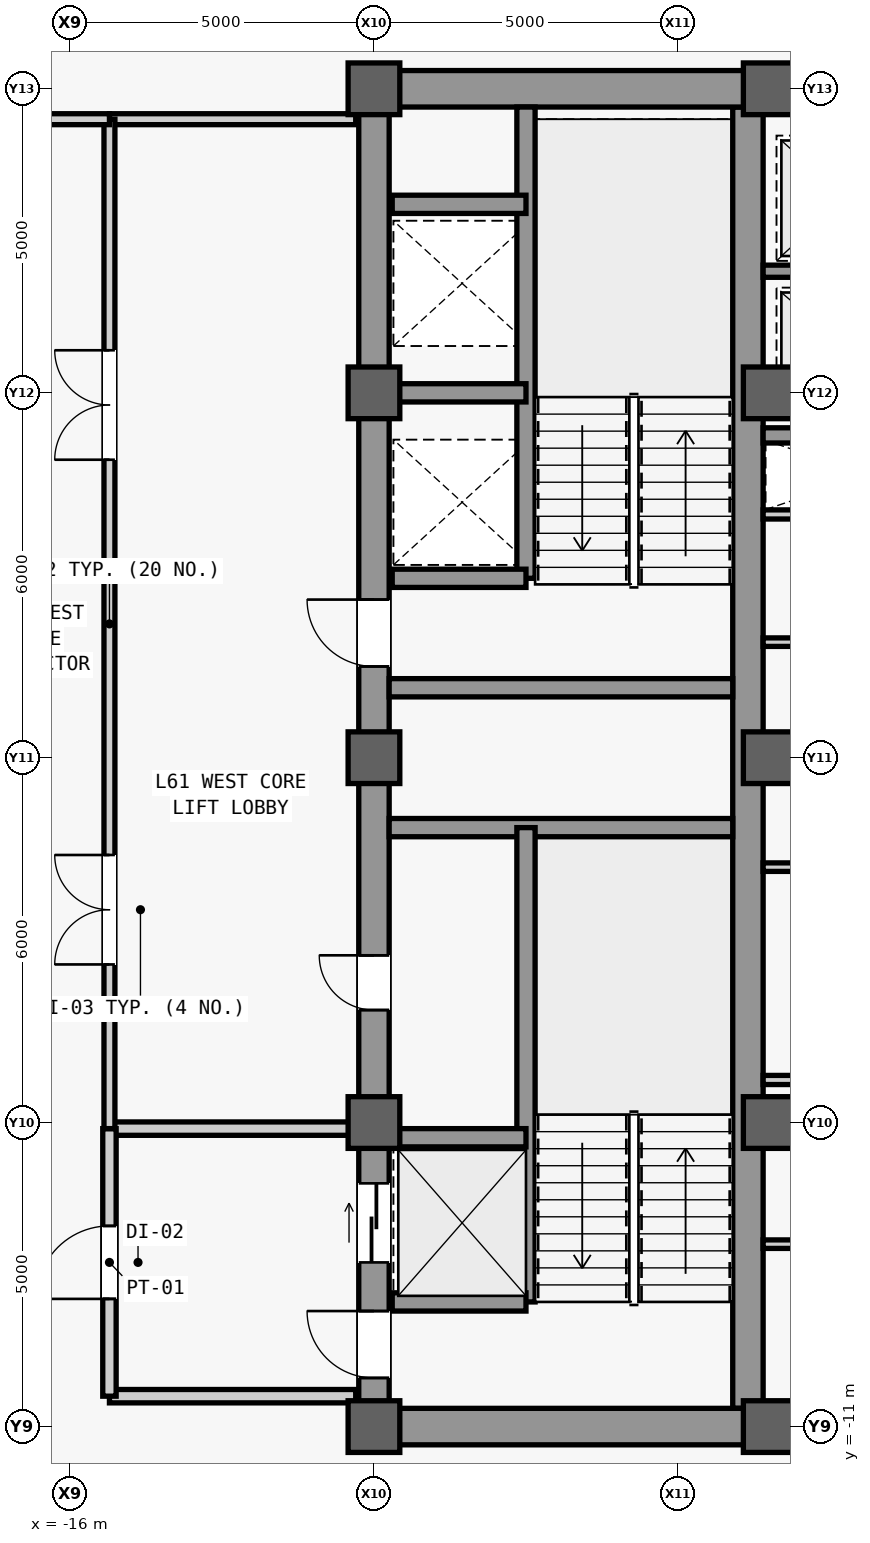
"""IFC4 building model, lengths in metres.
Left out: names, types, materials, properties, quantities, classifications, styles, units other than length and angle.
Written with IfcOpenShell. Run it as: python <this file> out.ifc"""

import sys

from ifc_helpers import new_model, si_unit, direction, frame, frame_2d, origin, origin_2d, place, context, subcontext, project, spatial, rectangle, extrude, source, transform, mapped, element, fill, save


model = new_model("IFC4")
c1 = context("Model", 3, precision=1e-05, world=origin(), true_north=direction((0.0, 1.0)))
c2 = subcontext(c1, "Body", "Model", "MODEL_VIEW")
j1 = project(units=[si_unit("LENGTHUNIT", "METRE"), si_unit("PLANEANGLEUNIT", "RADIAN")], contexts=[c1])
p1 = place(None, origin())
s1 = spatial("IfcSite", under=j1, at=p1, CompositionType="ELEMENT")
p2 = place(p1, origin())
s2 = spatial("IfcBuilding", under=s1, at=p2, CompositionType="ELEMENT")
p3 = place(p2, frame((0.0, 0.0, 259.1)))
s3 = spatial("IfcBuildingStorey", under=s2, at=p3, CompositionType="ELEMENT", Elevation=259.1)
m1 = source(origin(), c2, "Body", "SweptSolid", [
    extrude(rectangle(XDim=22.0, YDim=0.5, at=frame_2d((11.0, 0.0))), origin(), (0.0, 0.0, 1.0), 3.78),
])
p4 = place(p3, frame((-11.0, -11.0, 0.0), z_axis=(0.0, 0.0, 1.0), x_axis=(0.0, 1.0, 0.0)))
e1 = element("IfcWall", 1, at=p4, inside=s3, PredefinedType="SHEAR", context=c2, shape_type="MappedRepresentation", body=[
    mapped(m1, transform((0.0, 0.0, 0.0), scale=1.0)),
])
m2 = source(origin(), c2, "Body", "SweptSolid", [
    extrude(rectangle(XDim=1.1, YDim=2.2, at=frame_2d((0.55, 1.1))), frame((0.0, 0.26, 0.0), z_axis=(0.0, -1.0, 0.0), x_axis=(1.0, 0.0, 0.0)), (0.0, 0.0, 1.0), 0.52),
])
p5 = place(p4, frame((0.8, 0.0, 0.0)))
e2 = element("IfcOpeningElement", 2, at=p5, cuts=e1, PredefinedType="OPENING", context=c2, shape_type="MappedRepresentation", body=[
    mapped(m2, transform((0.0, 0.0, 0.0), scale=1.0)),
])
p6 = place(p4, frame((12.5, 0.0, 0.0)))
e3 = element("IfcOpeningElement", 3, at=p6, cuts=e1, PredefinedType="OPENING", context=c2, shape_type="MappedRepresentation", body=[
    mapped(m2, transform((0.0, 0.0, 0.0), scale=1.0)),
])
m3 = source(origin(), c2, "Body", "SweptSolid", [
    extrude(rectangle(XDim=0.9, YDim=2.15, at=frame_2d((0.45, 1.075))), frame((0.0, 0.26, 0.0), z_axis=(0.0, -1.0, 0.0), x_axis=(1.0, 0.0, 0.0)), (0.0, 0.0, 1.0), 0.52),
])
p7 = place(p4, frame((6.85, 0.0, 0.0)))
e4 = element("IfcOpeningElement", 4, at=p7, cuts=e1, PredefinedType="OPENING", context=c2, shape_type="MappedRepresentation", body=[
    mapped(m3, transform((0.0, 0.0, 0.0), scale=1.0)),
])
m4 = source(origin(), c2, "Body", "SweptSolid", [
    extrude(rectangle(XDim=1.3, YDim=2.3, at=frame_2d((0.65, 1.15))), frame((0.0, 0.26, 0.0), z_axis=(0.0, -1.0, 0.0), x_axis=(1.0, 0.0, 0.0)), (0.0, 0.0, 1.0), 0.52),
])
p8 = place(p4, frame((2.7, 0.0, 0.0)))
e5 = element("IfcOpeningElement", 5, at=p8, cuts=e1, PredefinedType="OPENING", context=c2, shape_type="MappedRepresentation", body=[
    mapped(m4, transform((0.0, 0.0, 0.0), scale=1.0)),
])
m5 = source(origin(), c2, "Body", "SweptSolid", [
    extrude(rectangle(XDim=21.4, YDim=0.5, at=frame_2d((10.7, 0.0))), origin(), (0.0, 0.0, 1.0), 3.78),
])
p9 = place(p3, frame((-4.85, -10.7, 0.0), z_axis=(0.0, 0.0, 1.0), x_axis=(0.0, 1.0, 0.0)))
e6 = element("IfcWall", 6, at=p9, inside=s3, PredefinedType="SHEAR", context=c2, shape_type="MappedRepresentation", body=[
    mapped(m5, transform((0.0, 0.0, 0.0), scale=1.0)),
])
m6 = source(origin(), c2, "Body", "SweptSolid", [
    extrude(rectangle(XDim=5.9, YDim=0.6, at=frame_2d((2.95, 0.0))), origin(), (0.0, 0.0, 1.0), 3.78),
])
for number, where, z_axis, x_axis in (
    (7, (-10.75, -11.0, 0.0), (0.0, 0.0, 1.0), (1.0, 0.0, 0.0)),
    (8, (-10.75, 11.0, 0.0), (0.0, 0.0, 1.0), (1.0, 0.0, 0.0)),
):
    element("IfcWall", number, at=place(p3, frame(where, z_axis=z_axis, x_axis=x_axis)), inside=s3, PredefinedType="SHEAR", context=c2, shape_type="MappedRepresentation", body=[
        mapped(m6, transform((0.0, 0.0, 0.0), scale=1.0)),
    ])
m7 = source(origin(), c2, "Body", "SweptSolid", [
    extrude(rectangle(XDim=5.65, YDim=0.3, at=frame_2d((2.825, 0.0))), origin(), (0.0, 0.0, 1.0), 3.78),
])
for number, where, z_axis, x_axis in (
    (9, (-10.75, -1.15, 0.0), (0.0, 0.0, 1.0), (1.0, 0.0, 0.0)),
    (10, (-10.75, 1.15, 0.0), (0.0, 0.0, 1.0), (1.0, 0.0, 0.0)),
):
    element("IfcWall", number, at=place(p3, frame(where, z_axis=z_axis, x_axis=x_axis)), inside=s3, PredefinedType="SHEAR", context=c2, shape_type="MappedRepresentation", body=[
        mapped(m7, transform((0.0, 0.0, 0.0), scale=1.0)),
    ])
m8 = source(origin(), c2, "Body", "SweptSolid", [
    extrude(rectangle(XDim=9.2, YDim=0.5, at=frame_2d((4.6, 0.0))), origin(), (0.0, 0.0, 1.0), 3.78),
])
p10 = place(p3, frame((-4.6, -11.0, 0.0), z_axis=(0.0, 0.0, 1.0), x_axis=(1.0, 0.0, 0.0)))
e11 = element("IfcWall", 11, at=p10, inside=s3, PredefinedType="SHEAR", context=c2, shape_type="MappedRepresentation", body=[
    mapped(m8, transform((0.0, 0.0, 0.0), scale=1.0)),
])
m9 = source(origin(), c2, "Body", "SweptSolid", [
    extrude(rectangle(XDim=1.8, YDim=2.25, at=frame_2d((0.9, 1.125))), frame((0.0, 0.26, 0.0), z_axis=(0.0, -1.0, 0.0), x_axis=(1.0, 0.0, 0.0)), (0.0, 0.0, 1.0), 0.52),
])
p11 = place(p10, frame((3.7, 0.0, 0.0)))
e12 = element("IfcOpeningElement", 12, at=p11, cuts=e11, PredefinedType="OPENING", context=c2, shape_type="MappedRepresentation", body=[
    mapped(m9, transform((0.0, 0.0, 0.0), scale=1.0)),
])
p12 = place(p3, frame((-4.6, 11.0, 0.0), z_axis=(0.0, 0.0, 1.0), x_axis=(1.0, 0.0, 0.0)))
e13 = element("IfcWall", 13, at=p12, inside=s3, PredefinedType="SHEAR", context=c2, shape_type="MappedRepresentation", body=[
    mapped(m8, transform((0.0, 0.0, 0.0), scale=1.0)),
])
p13 = place(p12, frame((3.7, 0.0, 0.0)))
e14 = element("IfcOpeningElement", 14, at=p13, cuts=e13, PredefinedType="OPENING", context=c2, shape_type="MappedRepresentation", body=[
    mapped(m9, transform((0.0, 0.0, 0.0), scale=1.0)),
])
m10 = source(origin(), c2, "Body", "SweptSolid", [
    extrude(rectangle(XDim=0.85, YDim=0.85, at=origin_2d()), origin(), (0.0, 0.0, 1.0), 4.0),
])
for number, where, z_axis, x_axis in (
    (15, (-11.0, -11.0, 0.0), (0.0, 0.0, 1.0), (1.0, 0.0, 0.0)),
    (16, (-11.0, -6.0, 0.0), (0.0, 0.0, 1.0), (1.0, 0.0, 0.0)),
    (17, (-11.0, 0.0, 0.0), (0.0, 0.0, 1.0), (1.0, 0.0, 0.0)),
    (18, (-11.0, 6.0, 0.0), (0.0, 0.0, 1.0), (1.0, 0.0, 0.0)),
    (19, (-11.0, 11.0, 0.0), (0.0, 0.0, 1.0), (1.0, 0.0, 0.0)),
    (20, (-4.5, -11.0, 0.0), (0.0, 0.0, 1.0), (1.0, 0.0, 0.0)),
    (21, (-4.5, -6.0, 0.0), (0.0, 0.0, 1.0), (1.0, 0.0, 0.0)),
    (22, (-4.5, 0.0, 0.0), (0.0, 0.0, 1.0), (1.0, 0.0, 0.0)),
    (23, (-4.5, 6.0, 0.0), (0.0, 0.0, 1.0), (1.0, 0.0, 0.0)),
    (24, (-4.5, 11.0, 0.0), (0.0, 0.0, 1.0), (1.0, 0.0, 0.0)),
):
    element("IfcColumn", number, at=place(p3, frame(where, z_axis=z_axis, x_axis=x_axis)), inside=s3, PredefinedType="COLUMN", context=c2, shape_type="MappedRepresentation", body=[
        mapped(m10, transform((0.0, 0.0, 0.0), scale=1.0)),
    ])
m11 = source(origin(), c2, "Body", "SweptSolid", [
    extrude(rectangle(XDim=7.8, YDim=0.3, at=frame_2d((3.9, 0.0))), origin(), (0.0, 0.0, 1.0), 3.78),
])
p14 = place(p3, frame((-8.5, -8.95, 0.0), z_axis=(0.0, 0.0, 1.0), x_axis=(0.0, 1.0, 0.0)))
e25 = element("IfcWall", 25, at=p14, inside=s3, PredefinedType="SHEAR", context=c2, shape_type="MappedRepresentation", body=[
    mapped(m11, transform((0.0, 0.0, 0.0), scale=1.0)),
])
m12 = source(origin(), c2, "Body", "SweptSolid", [
    extrude(rectangle(XDim=2.2, YDim=0.3, at=frame_2d((1.1, 0.0))), origin(), (0.0, 0.0, 1.0), 3.78),
])
for number, where, z_axis, x_axis in (
    (26, (-10.7, -8.95, 0.0), (0.0, 0.0, 1.0), (1.0, 0.0, 0.0)),
    (27, (-10.7, -6.25, 0.0), (0.0, 0.0, 1.0), (1.0, 0.0, 0.0)),
):
    element("IfcWall", number, at=place(p3, frame(where, z_axis=z_axis, x_axis=x_axis)), inside=s3, PredefinedType="SHEAR", context=c2, shape_type="MappedRepresentation", body=[
        mapped(m12, transform((0.0, 0.0, 0.0), scale=1.0)),
    ])
m13 = source(origin(), c2, "Body", "SweptSolid", [
    extrude(rectangle(XDim=7.75, YDim=0.3, at=frame_2d((3.875, 0.0))), origin(), (0.0, 0.0, 1.0), 3.78),
])
p15 = place(p3, frame((-8.5, 2.95, 0.0), z_axis=(0.0, 0.0, 1.0), x_axis=(0.0, 1.0, 0.0)))
e28 = element("IfcWall", 28, at=p15, inside=s3, PredefinedType="SHEAR", context=c2, shape_type="MappedRepresentation", body=[
    mapped(m13, transform((0.0, 0.0, 0.0), scale=1.0)),
])
for number, where, z_axis, x_axis in (
    (29, (-10.7, 2.95, 0.0), (0.0, 0.0, 1.0), (1.0, 0.0, 0.0)),
    (30, (-10.7, 6.0, 0.0), (0.0, 0.0, 1.0), (1.0, 0.0, 0.0)),
    (31, (-10.7, 9.1, 0.0), (0.0, 0.0, 1.0), (1.0, 0.0, 0.0)),
):
    element("IfcWall", number, at=place(p3, frame(where, z_axis=z_axis, x_axis=x_axis)), inside=s3, PredefinedType="SHEAR", context=c2, shape_type="MappedRepresentation", body=[
        mapped(m12, transform((0.0, 0.0, 0.0), scale=1.0)),
    ])
m14 = source(origin(), c2, "Body", "SweptSolid", [
    extrude(rectangle(XDim=4.05, YDim=0.22, at=frame_2d((2.025, 0.0))), origin(), (0.0, 0.0, 1.0), 3.78),
])
p16 = place(p3, frame((-15.35, -10.5, 0.0), z_axis=(0.0, 0.0, 1.0), x_axis=(1.0, 0.0, 0.0)))
e32 = element("IfcWall", 32, at=p16, inside=s3, PredefinedType="PARTITIONING", context=c2, shape_type="MappedRepresentation", body=[
    mapped(m14, transform((0.0, 0.0, 0.0), scale=1.0)),
])
m15 = source(origin(), c2, "Body", "SweptSolid", [
    extrude(rectangle(XDim=4.05, YDim=0.22, at=frame_2d((2.025, 0.0))), origin(), (0.0, 0.0, 1.0), 3.085),
])
p17 = place(p3, frame((-15.35, -6.1, 0.0), z_axis=(0.0, 0.0, 1.0), x_axis=(1.0, 0.0, 0.0)))
e33 = element("IfcWall", 33, at=p17, inside=s3, PredefinedType="PARTITIONING", context=c2, shape_type="MappedRepresentation", body=[
    mapped(m15, transform((0.0, 0.0, 0.0), scale=1.0)),
])
m16 = source(origin(), c2, "Body", "SweptSolid", [
    extrude(rectangle(XDim=4.4, YDim=0.22, at=frame_2d((2.2, 0.0))), origin(), (0.0, 0.0, 1.0), 3.78),
])
p18 = place(p3, frame((-15.35, -10.5, 0.0), z_axis=(0.0, 0.0, 1.0), x_axis=(0.0, 1.0, 0.0)))
e34 = element("IfcWall", 34, at=p18, inside=s3, PredefinedType="PARTITIONING", context=c2, shape_type="MappedRepresentation", body=[
    mapped(m16, transform((0.0, 0.0, 0.0), scale=1.0)),
])
m17 = source(origin(), c2, "Body", "SweptSolid", [
    extrude(rectangle(XDim=1.2, YDim=2.2, at=frame_2d((0.6, 1.1))), frame((0.0, 0.12, 0.0), z_axis=(0.0, -1.0, 0.0), x_axis=(1.0, 0.0, 0.0)), (0.0, 0.0, 1.0), 0.24),
])
p19 = place(p18, frame((1.6, 0.0, 0.0)))
e35 = element("IfcOpeningElement", 35, at=p19, cuts=e34, PredefinedType="OPENING", context=c2, shape_type="MappedRepresentation", body=[
    mapped(m17, transform((0.0, 0.0, 0.0), scale=1.0)),
])
m18 = source(origin(), c2, "Body", "SweptSolid", [
    extrude(rectangle(XDim=4.05, YDim=0.18, at=frame_2d((2.025, 0.0))), origin(), (0.0, 0.0, 1.0), 3.78),
])
p20 = place(p3, frame((-15.35, 10.5, 0.0), z_axis=(0.0, 0.0, 1.0), x_axis=(1.0, 0.0, 0.0)))
e36 = element("IfcWall", 36, at=p20, inside=s3, PredefinedType="PARTITIONING", context=c2, shape_type="MappedRepresentation", body=[
    mapped(m18, transform((0.0, 0.0, 0.0), scale=1.0)),
])
m19 = source(origin(), c2, "Body", "SweptSolid", [
    extrude(rectangle(XDim=16.6, YDim=0.18, at=frame_2d((8.3, 0.0))), origin(), (0.0, 0.0, 1.0), 3.78),
])
p21 = place(p3, frame((-15.35, -6.1, 0.0), z_axis=(0.0, 0.0, 1.0), x_axis=(0.0, 1.0, 0.0)))
e37 = element("IfcWall", 37, at=p21, inside=s3, PredefinedType="PARTITIONING", context=c2, shape_type="MappedRepresentation", body=[
    mapped(m19, transform((0.0, 0.0, 0.0), scale=1.0)),
])
m20 = source(origin(), c2, "Body", "SweptSolid", [
    extrude(rectangle(XDim=1.8, YDim=2.25, at=frame_2d((0.9, 1.125))), frame((0.0, 0.1, 0.0), z_axis=(0.0, -1.0, 0.0), x_axis=(1.0, 0.0, 0.0)), (0.0, 0.0, 1.0), 0.2),
])
p22 = place(p21, frame((2.7, 0.0, 0.0)))
e38 = element("IfcOpeningElement", 38, at=p22, cuts=e37, PredefinedType="OPENING", context=c2, shape_type="MappedRepresentation", body=[
    mapped(m20, transform((0.0, 0.0, 0.0), scale=1.0)),
])
p23 = place(p21, frame((11.0, 0.0, 0.0)))
e39 = element("IfcOpeningElement", 39, at=p23, cuts=e37, PredefinedType="OPENING", context=c2, shape_type="MappedRepresentation", body=[
    mapped(m20, transform((0.0, 0.0, 0.0), scale=1.0)),
])
m21 = source(origin(), c2, "Body", "SweptSolid", [
    extrude(rectangle(XDim=3.45, YDim=0.15, at=frame_2d((1.725, 0.0))), origin(), (0.0, 0.0, 1.0), 3.78),
])
p24 = place(p3, frame((-4.6, 4.0, 0.0), z_axis=(0.0, 0.0, 1.0), x_axis=(1.0, 0.0, 0.0)))
e40 = element("IfcWall", 40, at=p24, inside=s3, PredefinedType="PARTITIONING", context=c2, shape_type="MappedRepresentation", body=[
    mapped(m21, transform((0.0, 0.0, 0.0), scale=1.0)),
])
m22 = source(origin(), c2, "Body", "SweptSolid", [
    extrude(rectangle(XDim=3.45, YDim=0.14, at=frame_2d((1.725, 0.0))), origin(), (0.0, 0.0, 1.0), 3.78),
])
p25 = place(p3, frame((-4.6, -8.0, 0.0), z_axis=(0.0, 0.0, 1.0), x_axis=(1.0, 0.0, 0.0)))
e41 = element("IfcWall", 41, at=p25, inside=s3, PredefinedType="PARTITIONING", context=c2, shape_type="MappedRepresentation", body=[
    mapped(m22, transform((0.0, 0.0, 0.0), scale=1.0)),
])
p26 = place(p3, frame((-4.6, -5.3, 0.0), z_axis=(0.0, 0.0, 1.0), x_axis=(1.0, 0.0, 0.0)))
e42 = element("IfcWall", 42, at=p26, inside=s3, PredefinedType="PARTITIONING", context=c2, shape_type="MappedRepresentation", body=[
    mapped(m21, transform((0.0, 0.0, 0.0), scale=1.0)),
])
m23 = source(origin(), c2, "Body", "SweptSolid", [
    extrude(rectangle(XDim=2.45, YDim=0.2, at=frame_2d((1.225, 0.0))), origin(), (0.0, 0.0, 1.0), 3.78),
])
p27 = place(p3, frame((-4.6, 8.0, 0.0), z_axis=(0.0, 0.0, 1.0), x_axis=(1.0, 0.0, 0.0)))
e43 = element("IfcWall", 43, at=p27, inside=s3, PredefinedType="SHEAR", context=c2, shape_type="MappedRepresentation", body=[
    mapped(m23, transform((0.0, 0.0, 0.0), scale=1.0)),
])
m24 = source(origin(), c2, "Body", "SweptSolid", [
    extrude(rectangle(XDim=9.2, YDim=0.25, at=frame_2d((4.6, 0.0))), origin(), (0.0, 0.0, 1.0), 3.78),
])
p28 = place(p3, frame((-4.6, 5.3, 0.0), z_axis=(0.0, 0.0, 1.0), x_axis=(1.0, 0.0, 0.0)))
e44 = element("IfcWall", 44, at=p28, inside=s3, PredefinedType="SHEAR", context=c2, shape_type="MappedRepresentation", body=[
    mapped(m24, transform((0.0, 0.0, 0.0), scale=1.0)),
])
m25 = source(origin(), c2, "Body", "SweptSolid", [
    extrude(rectangle(XDim=1.05, YDim=2.2, at=frame_2d((0.525, 1.1))), frame((0.0, 0.135, 0.0), z_axis=(0.0, -1.0, 0.0), x_axis=(1.0, 0.0, 0.0)), (0.0, 0.0, 1.0), 0.27),
])
p29 = place(p28, frame((4.075, 0.0, 0.0)))
e45 = element("IfcOpeningElement", 45, at=p29, cuts=e44, PredefinedType="OPENING", context=c2, shape_type="MappedRepresentation", body=[
    mapped(m25, transform((0.0, 0.0, 0.0), scale=1.0)),
])
for number, where, z_axis, x_axis in (
    (46, (-4.6, -1.8, 0.0), (0.0, 0.0, 1.0), (1.0, 0.0, 0.0)),
    (47, (-4.6, 1.9, 0.0), (0.0, 0.0, 1.0), (1.0, 0.0, 0.0)),
):
    element("IfcWall", number, at=place(p3, frame(where, z_axis=z_axis, x_axis=x_axis)), inside=s3, PredefinedType="PARTITIONING", context=c2, shape_type="MappedRepresentation", body=[
        mapped(m22, transform((0.0, 0.0, 0.0), scale=1.0)),
    ])
m26 = source(origin(), c2, "Body", "SweptSolid", [
    extrude(rectangle(XDim=2.45, YDim=0.18, at=frame_2d((1.225, 0.0))), origin(), (0.0, 0.0, 1.0), 3.78),
])
p30 = place(p3, frame((-17.8, 10.5, 0.0), z_axis=(0.0, 0.0, 1.0), x_axis=(1.0, 0.0, 0.0)))
e48 = element("IfcWall", 48, at=p30, inside=s3, PredefinedType="PARTITIONING", context=c2, shape_type="MappedRepresentation", body=[
    mapped(m26, transform((0.0, 0.0, 0.0), scale=1.0)),
])
m27 = source(origin(), c2, "Body", "SweptSolid", [
    extrude(rectangle(XDim=1.1, YDim=2.2, at=frame_2d((0.55, 1.1))), frame((0.0, 0.025, 0.0), z_axis=(0.0, -1.0, 0.0), x_axis=(1.0, 0.0, 0.0)), (0.0, 0.0, 1.0), 0.05),
])
p31 = place(p5, origin())
e49 = element("IfcDoor", 49, at=p31, inside=s3, OperationType="SINGLE_SWING_RIGHT", PredefinedType="DOOR", context=c2, shape_type="MappedRepresentation", body=[
    mapped(m27, transform((0.0, 0.0, 0.0), scale=1.0)),
])
fill(e2, e49)
p32 = place(p6, origin())
e50 = element("IfcDoor", 50, at=p32, inside=s3, OperationType="SINGLE_SWING_RIGHT", PredefinedType="DOOR", context=c2, shape_type="MappedRepresentation", body=[
    mapped(m27, transform((0.0, 0.0, 0.0), scale=1.0)),
])
fill(e3, e50)
m28 = source(origin(), c2, "Body", "SweptSolid", [
    extrude(rectangle(XDim=0.9, YDim=2.15, at=frame_2d((0.45, 1.075))), frame((0.0, 0.025, 0.0), z_axis=(0.0, -1.0, 0.0), x_axis=(1.0, 0.0, 0.0)), (0.0, 0.0, 1.0), 0.05),
])
p33 = place(p7, origin())
e51 = element("IfcDoor", 51, at=p33, inside=s3, OperationType="SINGLE_SWING_RIGHT", PredefinedType="DOOR", context=c2, shape_type="MappedRepresentation", body=[
    mapped(m28, transform((0.0, 0.0, 0.0), scale=1.0)),
])
fill(e4, e51)
m29 = source(origin(), c2, "Body", "SweptSolid", [
    extrude(rectangle(XDim=1.2, YDim=2.2, at=frame_2d((0.6, 1.1))), frame((0.0, 0.025, 0.0), z_axis=(0.0, -1.0, 0.0), x_axis=(1.0, 0.0, 0.0)), (0.0, 0.0, 1.0), 0.05),
])
p34 = place(p19, origin())
e52 = element("IfcDoor", 52, at=p34, inside=s3, OperationType="SINGLE_SWING_LEFT", PredefinedType="DOOR", context=c2, shape_type="MappedRepresentation", body=[
    mapped(m29, transform((0.0, 0.0, 0.0), scale=1.0)),
])
fill(e35, e52)
m30 = source(origin(), c2, "Body", "SweptSolid", [
    extrude(rectangle(XDim=1.8, YDim=2.25, at=frame_2d((0.9, 1.125))), frame((0.0, 0.025, 0.0), z_axis=(0.0, -1.0, 0.0), x_axis=(1.0, 0.0, 0.0)), (0.0, 0.0, 1.0), 0.05),
])
p35 = place(p22, origin())
e53 = element("IfcDoor", 53, at=p35, inside=s3, OperationType="SINGLE_SWING_LEFT", PredefinedType="DOOR", context=c2, shape_type="MappedRepresentation", body=[
    mapped(m30, transform((0.0, 0.0, 0.0), scale=1.0)),
])
fill(e38, e53)
p36 = place(p23, origin())
e54 = element("IfcDoor", 54, at=p36, inside=s3, OperationType="SINGLE_SWING_RIGHT", PredefinedType="DOOR", context=c2, shape_type="MappedRepresentation", body=[
    mapped(m30, transform((0.0, 0.0, 0.0), scale=1.0)),
])
fill(e39, e54)
m31 = source(origin(), c2, "Body", "SweptSolid", [
    extrude(rectangle(XDim=1.3, YDim=2.3, at=frame_2d((0.65, 1.15))), frame((0.0, 0.025, 0.0), z_axis=(0.0, -1.0, 0.0), x_axis=(1.0, 0.0, 0.0)), (0.0, 0.0, 1.0), 0.05),
])
p37 = place(p8, origin())
e55 = element("IfcDoor", 55, at=p37, inside=s3, OperationType="SLIDING_TO_LEFT", PredefinedType="DOOR", context=c2, shape_type="MappedRepresentation", body=[
    mapped(m31, transform((0.0, 0.0, 0.0), scale=1.0)),
])
fill(e5, e55)
save(model, sys.argv[1])
